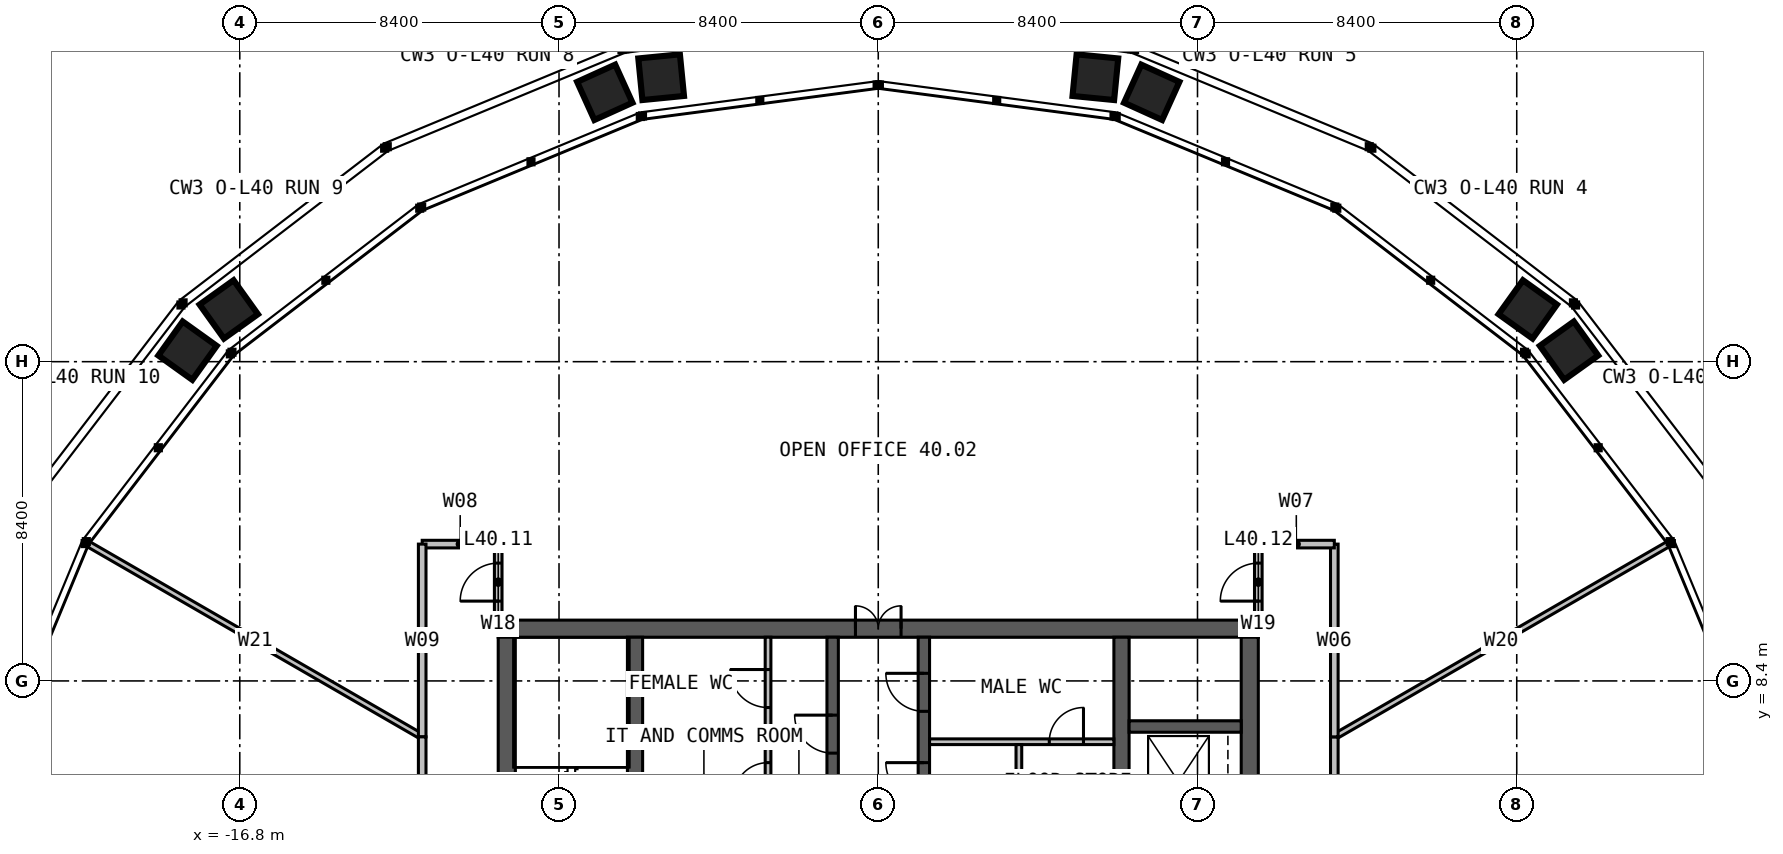
"""IFC4 building model, lengths in metres.
Left out: names, types, materials, properties, quantities, classifications, styles, units other than length and angle.
Written with IfcOpenShell. Run it as: python <this file> out.ifc"""

import sys

from ifc_helpers import new_model, si_unit, direction, frame, frame_2d, origin, place, context, subcontext, project, spatial, rectangle, extrude, element, fill, save


model = new_model("IFC4")
c1 = context("Model", 3, precision=1e-05, world=origin(), true_north=direction((0.0, 1.0)))
c2 = subcontext(c1, "Body", "Model", "MODEL_VIEW")
j1 = project(units=[si_unit("LENGTHUNIT", "METRE"), si_unit("PLANEANGLEUNIT", "RADIAN")], contexts=[c1])
p1 = place(None, origin())
s1 = spatial("IfcSite", under=j1, at=p1, CompositionType="ELEMENT")
p2 = place(p1, origin())
s2 = spatial("IfcBuilding", under=s1, at=p2, CompositionType="ELEMENT")
p3 = place(p2, frame((0.0, 0.0, 167.0)))
s3 = spatial("IfcBuildingStorey", under=s2, at=p3, CompositionType="ELEMENT", Elevation=167.0)
p4 = place(p3, frame((-10.0, 9.775, 0.0), z_axis=(0.0, 0.0, 1.0), x_axis=(1.0, 0.0, 0.0)))
e1 = element("IfcWall", 1, at=p4, inside=s3, PredefinedType="SOLIDWALL", context=c2, shape_type="SweptSolid", body=[
    extrude(rectangle(XDim=20.0, YDim=0.45, at=frame_2d((10.0, 0.0))), origin(), (0.0, 0.0, 1.0), 4.0),
])
p5 = place(p4, frame((9.4, 0.0, 0.0)))
e2 = element("IfcOpeningElement", 2, at=p5, cuts=e1, PredefinedType="OPENING", context=c2, shape_type="SweptSolid", body=[
    extrude(rectangle(XDim=1.2, YDim=2.2, at=frame_2d((0.6, 1.1))), frame((0.0, 0.235, 0.0), z_axis=(0.0, -1.0, 0.0), x_axis=(1.0, 0.0, 0.0)), (0.0, 0.0, 1.0), 0.47),
])
for number, where, z_axis, x_axis in (
    (3, (9.775, -9.55, 0.0), (0.0, 0.0, 1.0), (0.0, 1.0, 0.0)),
    (4, (-9.775, 9.55, 0.0), (0.0, 0.0, 1.0), (0.0, -1.0, 0.0)),
):
    element("IfcWall", number, at=place(p3, frame(where, z_axis=z_axis, x_axis=x_axis)), inside=s3, PredefinedType="SOLIDWALL", context=c2, shape_type="SweptSolid", body=[
        extrude(rectangle(XDim=19.1, YDim=0.45, at=frame_2d((9.55, 0.0))), origin(), (0.0, 0.0, 1.0), 4.0),
    ])
p6 = place(p3, frame((-6.4, -9.55, 0.0), z_axis=(0.0, 0.0, 1.0), x_axis=(0.0, 1.0, 0.0)))
e5 = element("IfcWall", 5, at=p6, inside=s3, PredefinedType="SOLIDWALL", context=c2, shape_type="SweptSolid", body=[
    extrude(rectangle(XDim=19.1, YDim=0.4, at=frame_2d((9.55, 0.0))), origin(), (0.0, 0.0, 1.0), 4.0),
])
p7 = place(p6, frame((9.05, 0.0, 0.0)))
e6 = element("IfcOpeningElement", 6, at=p7, cuts=e5, PredefinedType="OPENING", context=c2, shape_type="SweptSolid", body=[
    extrude(rectangle(XDim=1.0, YDim=2.2, at=frame_2d((0.5, 1.1))), frame((0.0, 0.21, 0.0), z_axis=(0.0, -1.0, 0.0), x_axis=(1.0, 0.0, 0.0)), (0.0, 0.0, 1.0), 0.42),
])
p8 = place(p3, frame((6.4, 9.55, 0.0), z_axis=(0.0, 0.0, 1.0), x_axis=(0.0, -1.0, 0.0)))
e7 = element("IfcWall", 7, at=p8, inside=s3, PredefinedType="SOLIDWALL", context=c2, shape_type="SweptSolid", body=[
    extrude(rectangle(XDim=19.1, YDim=0.4, at=frame_2d((9.55, 0.0))), origin(), (0.0, 0.0, 1.0), 4.0),
])
p9 = place(p8, frame((9.05, 0.0, 0.0)))
e8 = element("IfcOpeningElement", 8, at=p9, cuts=e7, PredefinedType="OPENING", context=c2, shape_type="SweptSolid", body=[
    extrude(rectangle(XDim=1.0, YDim=2.2, at=frame_2d((0.5, 1.1))), frame((0.0, 0.21, 0.0), z_axis=(0.0, -1.0, 0.0), x_axis=(1.0, 0.0, 0.0)), (0.0, 0.0, 1.0), 0.42),
])
p10 = place(p3, frame((-1.2, 1.45, 0.0), z_axis=(0.0, 0.0, 1.0), x_axis=(0.0, 1.0, 0.0)))
e9 = element("IfcWall", 9, at=p10, inside=s3, PredefinedType="SOLIDWALL", context=c2, shape_type="SweptSolid", body=[
    extrude(rectangle(XDim=8.1, YDim=0.3, at=frame_2d((4.05, 0.0))), origin(), (0.0, 0.0, 1.0), 4.0),
])
p11 = place(p10, frame((5.05, 0.0, 0.0)))
e10 = element("IfcOpeningElement", 10, at=p11, cuts=e9, PredefinedType="OPENING", context=c2, shape_type="SweptSolid", body=[
    extrude(rectangle(XDim=1.0, YDim=2.2, at=frame_2d((0.5, 1.1))), frame((0.0, 0.16, 0.0), z_axis=(0.0, -1.0, 0.0), x_axis=(1.0, 0.0, 0.0)), (0.0, 0.0, 1.0), 0.32),
])
p12 = place(p3, frame((1.2, 1.45, 0.0), z_axis=(0.0, 0.0, 1.0), x_axis=(0.0, 1.0, 0.0)))
e11 = element("IfcWall", 11, at=p12, inside=s3, PredefinedType="SOLIDWALL", context=c2, shape_type="SweptSolid", body=[
    extrude(rectangle(XDim=8.1, YDim=0.3, at=frame_2d((4.05, 0.0))), origin(), (0.0, 0.0, 1.0), 4.0),
])
p13 = place(p12, frame((3.8, 0.0, 0.0)))
e12 = element("IfcOpeningElement", 12, at=p13, cuts=e11, PredefinedType="OPENING", context=c2, shape_type="SweptSolid", body=[
    extrude(rectangle(XDim=1.0, YDim=2.2, at=frame_2d((0.5, 1.1))), frame((0.0, 0.16, 0.0), z_axis=(0.0, -1.0, 0.0), x_axis=(1.0, 0.0, 0.0)), (0.0, 0.0, 1.0), 0.32),
])
p14 = place(p12, frame((6.15, 0.0, 0.0)))
e13 = element("IfcOpeningElement", 13, at=p14, cuts=e11, PredefinedType="OPENING", context=c2, shape_type="SweptSolid", body=[
    extrude(rectangle(XDim=1.0, YDim=2.2, at=frame_2d((0.5, 1.1))), frame((0.0, 0.16, 0.0), z_axis=(0.0, -1.0, 0.0), x_axis=(1.0, 0.0, 0.0)), (0.0, 0.0, 1.0), 0.32),
])
p15 = place(p3, frame((6.6, 7.2, 0.0), z_axis=(0.0, 0.0, 1.0), x_axis=(1.0, 0.0, 0.0)))
e14 = element("IfcWall", 14, at=p15, inside=s3, PredefinedType="SOLIDWALL", context=c2, shape_type="SweptSolid", body=[
    extrude(rectangle(XDim=2.95, YDim=0.3, at=frame_2d((1.475, 0.0))), origin(), (0.0, 0.0, 1.0), 4.0),
])
p16 = place(p3, frame((1.35, 6.8, 0.0), z_axis=(0.0, 0.0, 1.0), x_axis=(1.0, 0.0, 0.0)))
e15 = element("IfcWall", 15, at=p16, inside=s3, PredefinedType="PARTITIONING", context=c2, shape_type="SweptSolid", body=[
    extrude(rectangle(XDim=4.85, YDim=0.15, at=frame_2d((2.425, 0.0))), origin(), (0.0, 0.0, 1.0), 3.75),
])
p17 = place(p16, frame((3.15, 0.0, 0.0)))
e16 = element("IfcOpeningElement", 16, at=p17, cuts=e15, PredefinedType="OPENING", context=c2, shape_type="SweptSolid", body=[
    extrude(rectangle(XDim=0.9, YDim=2.2, at=frame_2d((0.45, 1.1))), frame((0.0, 0.085, 0.0), z_axis=(0.0, -1.0, 0.0), x_axis=(1.0, 0.0, 0.0)), (0.0, 0.0, 1.0), 0.17),
])
p18 = place(p3, frame((3.7, 4.75, 0.0), z_axis=(0.0, 0.0, 1.0), x_axis=(0.0, 1.0, 0.0)))
e17 = element("IfcWall", 17, at=p18, inside=s3, PredefinedType="PARTITIONING", context=c2, shape_type="SweptSolid", body=[
    extrude(rectangle(XDim=1.975, YDim=0.15, at=frame_2d((0.988, 0.0))), origin(), (0.0, 0.0, 1.0), 3.75),
])
p19 = place(p3, frame((-2.9, 4.75, 0.0), z_axis=(0.0, 0.0, 1.0), x_axis=(0.0, 1.0, 0.0)))
e18 = element("IfcWall", 18, at=p19, inside=s3, PredefinedType="PARTITIONING", context=c2, shape_type="SweptSolid", body=[
    extrude(rectangle(XDim=4.8, YDim=0.15, at=frame_2d((2.4, 0.0))), origin(), (0.0, 0.0, 1.0), 3.75),
])
p20 = place(p19, frame((2.95, 0.0, 0.0)))
e19 = element("IfcOpeningElement", 19, at=p20, cuts=e18, PredefinedType="OPENING", context=c2, shape_type="SweptSolid", body=[
    extrude(rectangle(XDim=1.0, YDim=2.2, at=frame_2d((0.5, 1.1))), frame((0.0, 0.085, 0.0), z_axis=(0.0, -1.0, 0.0), x_axis=(1.0, 0.0, 0.0)), (0.0, 0.0, 1.0), 0.17),
])
p21 = place(p19, frame((0.6, 0.0, 0.0)))
e20 = element("IfcOpeningElement", 20, at=p21, cuts=e18, PredefinedType="OPENING", context=c2, shape_type="SweptSolid", body=[
    extrude(rectangle(XDim=0.9, YDim=2.2, at=frame_2d((0.45, 1.1))), frame((0.0, 0.085, 0.0), z_axis=(0.0, -1.0, 0.0), x_axis=(1.0, 0.0, 0.0)), (0.0, 0.0, 1.0), 0.17),
])
p22 = place(p3, frame((-6.2, 7.0, 0.0), z_axis=(0.0, 0.0, 1.0), x_axis=(1.0, 0.0, 0.0)))
e21 = element("IfcWall", 21, at=p22, inside=s3, PredefinedType="PARTITIONING", context=c2, shape_type="SweptSolid", body=[
    extrude(rectangle(XDim=3.225, YDim=0.15, at=frame_2d((1.612, 0.0))), origin(), (0.0, 0.0, 1.0), 3.75),
])
for number, where, z_axis, x_axis in (
    (22, (12.0, 6.928, 0.0), (0.0, 0.0, 1.0), (0.866, 0.5, 0.0)),
    (23, (-12.0, 6.928, 0.0), (0.0, 0.0, 1.0), (-0.866, 0.5, 0.0)),
):
    element("IfcWall", number, at=place(p3, frame(where, z_axis=z_axis, x_axis=x_axis)), inside=s3, PredefinedType="PARTITIONING", context=c2, shape_type="SweptSolid", body=[
        extrude(rectangle(XDim=10.136, YDim=0.15, at=frame_2d((5.068, 0.0))), origin(), (0.0, 0.0, 1.0), 2.79),
    ])
p23 = place(p3, frame((12.0, -6.928, 0.0), z_axis=(0.0, 0.0, 1.0), x_axis=(0.0, 1.0, 0.0)))
e24 = element("IfcWall", 24, at=p23, inside=s3, PredefinedType="PARTITIONING", context=c2, shape_type="SweptSolid", body=[
    extrude(rectangle(XDim=13.856, YDim=0.2, at=frame_2d((6.928, 0.0))), origin(), (0.0, 0.0, 1.0), 3.8),
])
p24 = place(p23, frame((6.028, 0.0, 0.0)))
e25 = element("IfcOpeningElement", 25, at=p24, cuts=e24, PredefinedType="OPENING", context=c2, shape_type="SweptSolid", body=[
    extrude(rectangle(XDim=1.8, YDim=2.2, at=frame_2d((0.9, 1.1))), frame((0.0, 0.11, 0.0), z_axis=(0.0, -1.0, 0.0), x_axis=(1.0, 0.0, 0.0)), (0.0, 0.0, 1.0), 0.22),
])
p25 = place(p3, frame((12.0, 6.928, 0.0), z_axis=(0.0, 0.0, 1.0), x_axis=(0.0, 1.0, 0.0)))
e26 = element("IfcWall", 26, at=p25, inside=s3, PredefinedType="PARTITIONING", context=c2, shape_type="SweptSolid", body=[
    extrude(rectangle(XDim=5.072, YDim=0.2, at=frame_2d((2.536, 0.0))), origin(), (0.0, 0.0, 1.0), 3.8),
])
for number, where, z_axis, x_axis in (
    (27, (12.0, 12.0, 0.0), (0.0, 0.0, 1.0), (-1.0, 0.0, 0.0)),
    (28, (-10.0, 12.0, 0.0), (0.0, 0.0, 1.0), (-1.0, 0.0, 0.0)),
):
    element("IfcWall", number, at=place(p3, frame(where, z_axis=z_axis, x_axis=x_axis)), inside=s3, PredefinedType="PARTITIONING", context=c2, shape_type="SweptSolid", body=[
        extrude(rectangle(XDim=2.0, YDim=0.2, at=frame_2d((1.0, 0.0))), origin(), (0.0, 0.0, 1.0), 3.8),
    ])
p26 = place(p3, frame((-12.0, 12.0, 0.0), z_axis=(0.0, 0.0, 1.0), x_axis=(0.0, -1.0, 0.0)))
e29 = element("IfcWall", 29, at=p26, inside=s3, PredefinedType="PARTITIONING", context=c2, shape_type="SweptSolid", body=[
    extrude(rectangle(XDim=5.072, YDim=0.2, at=frame_2d((2.536, 0.0))), origin(), (0.0, 0.0, 1.0), 3.8),
])
p27 = place(p3, frame((-12.0, 6.928, 0.0), z_axis=(0.0, 0.0, 1.0), x_axis=(0.0, -1.0, 0.0)))
e30 = element("IfcWall", 30, at=p27, inside=s3, PredefinedType="PARTITIONING", context=c2, shape_type="SweptSolid", body=[
    extrude(rectangle(XDim=6.928, YDim=0.2, at=frame_2d((3.464, 0.0))), origin(), (0.0, 0.0, 1.0), 3.8),
])
p28 = place(p27, frame((2.964, 0.0, 0.0)))
e31 = element("IfcOpeningElement", 31, at=p28, cuts=e30, PredefinedType="OPENING", context=c2, shape_type="SweptSolid", body=[
    extrude(rectangle(XDim=1.0, YDim=2.2, at=frame_2d((0.5, 1.1))), frame((0.0, 0.11, 0.0), z_axis=(0.0, -1.0, 0.0), x_axis=(1.0, 0.0, 0.0)), (0.0, 0.0, 1.0), 0.22),
])
p29 = place(p3, frame((-10.0, 10.0, 0.0), z_axis=(0.0, 0.0, 1.0), x_axis=(0.0, 1.0, 0.0)))
e32 = element("IfcWall", 32, at=p29, inside=s3, PredefinedType="PARTITIONING", context=c2, shape_type="SweptSolid", body=[
    extrude(rectangle(XDim=2.0, YDim=0.2, at=frame_2d((1.0, 0.0))), origin(), (0.0, 0.0, 1.0), 3.8),
])
p30 = place(p29, frame((0.5, 0.0, 0.0)))
e33 = element("IfcOpeningElement", 33, at=p30, cuts=e32, PredefinedType="OPENING", context=c2, shape_type="SweptSolid", body=[
    extrude(rectangle(XDim=1.0, YDim=2.2, at=frame_2d((0.5, 1.1))), frame((0.0, 0.11, 0.0), z_axis=(0.0, -1.0, 0.0), x_axis=(1.0, 0.0, 0.0)), (0.0, 0.0, 1.0), 0.22),
])
p31 = place(p3, frame((10.0, 10.0, 0.0), z_axis=(0.0, 0.0, 1.0), x_axis=(0.0, 1.0, 0.0)))
e34 = element("IfcWall", 34, at=p31, inside=s3, PredefinedType="PARTITIONING", context=c2, shape_type="SweptSolid", body=[
    extrude(rectangle(XDim=2.0, YDim=0.2, at=frame_2d((1.0, 0.0))), origin(), (0.0, 0.0, 1.0), 3.8),
])
p32 = place(p31, frame((0.5, 0.0, 0.0)))
e35 = element("IfcOpeningElement", 35, at=p32, cuts=e34, PredefinedType="OPENING", context=c2, shape_type="SweptSolid", body=[
    extrude(rectangle(XDim=1.0, YDim=2.2, at=frame_2d((0.5, 1.1))), frame((0.0, 0.11, 0.0), z_axis=(0.0, -1.0, 0.0), x_axis=(1.0, 0.0, 0.0)), (0.0, 0.0, 1.0), 0.22),
])
p33 = place(p5, origin())
e36 = element("IfcDoor", 36, at=p33, inside=s3, OperationType="DOUBLE_DOOR_SINGLE_SWING", PredefinedType="DOOR", context=c2, shape_type="SweptSolid", body=[
    extrude(rectangle(XDim=1.2, YDim=2.2, at=frame_2d((0.6, 1.1))), frame((0.0, 0.025, 0.0), z_axis=(0.0, -1.0, 0.0), x_axis=(1.0, 0.0, 0.0)), (0.0, 0.0, 1.0), 0.05),
])
fill(e2, e36)
p34 = place(p11, origin())
e37 = element("IfcDoor", 37, at=p34, inside=s3, OperationType="SINGLE_SWING_RIGHT", PredefinedType="DOOR", context=c2, shape_type="SweptSolid", body=[
    extrude(rectangle(XDim=1.0, YDim=2.2, at=frame_2d((0.5, 1.1))), frame((0.0, 0.025, 0.0), z_axis=(0.0, -1.0, 0.0), x_axis=(1.0, 0.0, 0.0)), (0.0, 0.0, 1.0), 0.05),
])
fill(e10, e37)
p35 = place(p13, origin())
e38 = element("IfcDoor", 38, at=p35, inside=s3, OperationType="SINGLE_SWING_RIGHT", PredefinedType="DOOR", context=c2, shape_type="SweptSolid", body=[
    extrude(rectangle(XDim=1.0, YDim=2.2, at=frame_2d((0.5, 1.1))), frame((0.0, 0.025, 0.0), z_axis=(0.0, -1.0, 0.0), x_axis=(1.0, 0.0, 0.0)), (0.0, 0.0, 1.0), 0.05),
])
fill(e12, e38)
p36 = place(p14, origin())
e39 = element("IfcDoor", 39, at=p36, inside=s3, OperationType="SINGLE_SWING_RIGHT", PredefinedType="DOOR", context=c2, shape_type="SweptSolid", body=[
    extrude(rectangle(XDim=1.0, YDim=2.2, at=frame_2d((0.5, 1.1))), frame((0.0, 0.025, 0.0), z_axis=(0.0, -1.0, 0.0), x_axis=(1.0, 0.0, 0.0)), (0.0, 0.0, 1.0), 0.05),
])
fill(e13, e39)
p37 = place(p17, origin())
e40 = element("IfcDoor", 40, at=p37, inside=s3, OperationType="SINGLE_SWING_RIGHT", PredefinedType="DOOR", context=c2, shape_type="SweptSolid", body=[
    extrude(rectangle(XDim=0.9, YDim=2.2, at=frame_2d((0.45, 1.1))), frame((0.0, 0.025, 0.0), z_axis=(0.0, -1.0, 0.0), x_axis=(1.0, 0.0, 0.0)), (0.0, 0.0, 1.0), 0.05),
])
fill(e16, e40)
p38 = place(p20, origin())
e41 = element("IfcDoor", 41, at=p38, inside=s3, OperationType="SINGLE_SWING_RIGHT", PredefinedType="DOOR", context=c2, shape_type="SweptSolid", body=[
    extrude(rectangle(XDim=1.0, YDim=2.2, at=frame_2d((0.5, 1.1))), frame((0.0, 0.025, 0.0), z_axis=(0.0, -1.0, 0.0), x_axis=(1.0, 0.0, 0.0)), (0.0, 0.0, 1.0), 0.05),
])
fill(e19, e41)
p39 = place(p21, origin())
e42 = element("IfcDoor", 42, at=p39, inside=s3, OperationType="SINGLE_SWING_LEFT", PredefinedType="DOOR", context=c2, shape_type="SweptSolid", body=[
    extrude(rectangle(XDim=0.9, YDim=2.2, at=frame_2d((0.45, 1.1))), frame((0.0, 0.025, 0.0), z_axis=(0.0, -1.0, 0.0), x_axis=(1.0, 0.0, 0.0)), (0.0, 0.0, 1.0), 0.05),
])
fill(e20, e42)
p40 = place(p30, origin())
e43 = element("IfcDoor", 43, at=p40, inside=s3, OperationType="SINGLE_SWING_LEFT", PredefinedType="DOOR", context=c2, shape_type="SweptSolid", body=[
    extrude(rectangle(XDim=1.0, YDim=2.2, at=frame_2d((0.5, 1.1))), frame((0.0, 0.025, 0.0), z_axis=(0.0, -1.0, 0.0), x_axis=(1.0, 0.0, 0.0)), (0.0, 0.0, 1.0), 0.05),
])
fill(e33, e43)
p41 = place(p32, origin())
e44 = element("IfcDoor", 44, at=p41, inside=s3, OperationType="SINGLE_SWING_LEFT", PredefinedType="DOOR", context=c2, shape_type="SweptSolid", body=[
    extrude(rectangle(XDim=1.0, YDim=2.2, at=frame_2d((0.5, 1.1))), frame((0.0, 0.025, 0.0), z_axis=(0.0, -1.0, 0.0), x_axis=(1.0, 0.0, 0.0)), (0.0, 0.0, 1.0), 0.05),
])
fill(e35, e44)
save(model, sys.argv[1])
